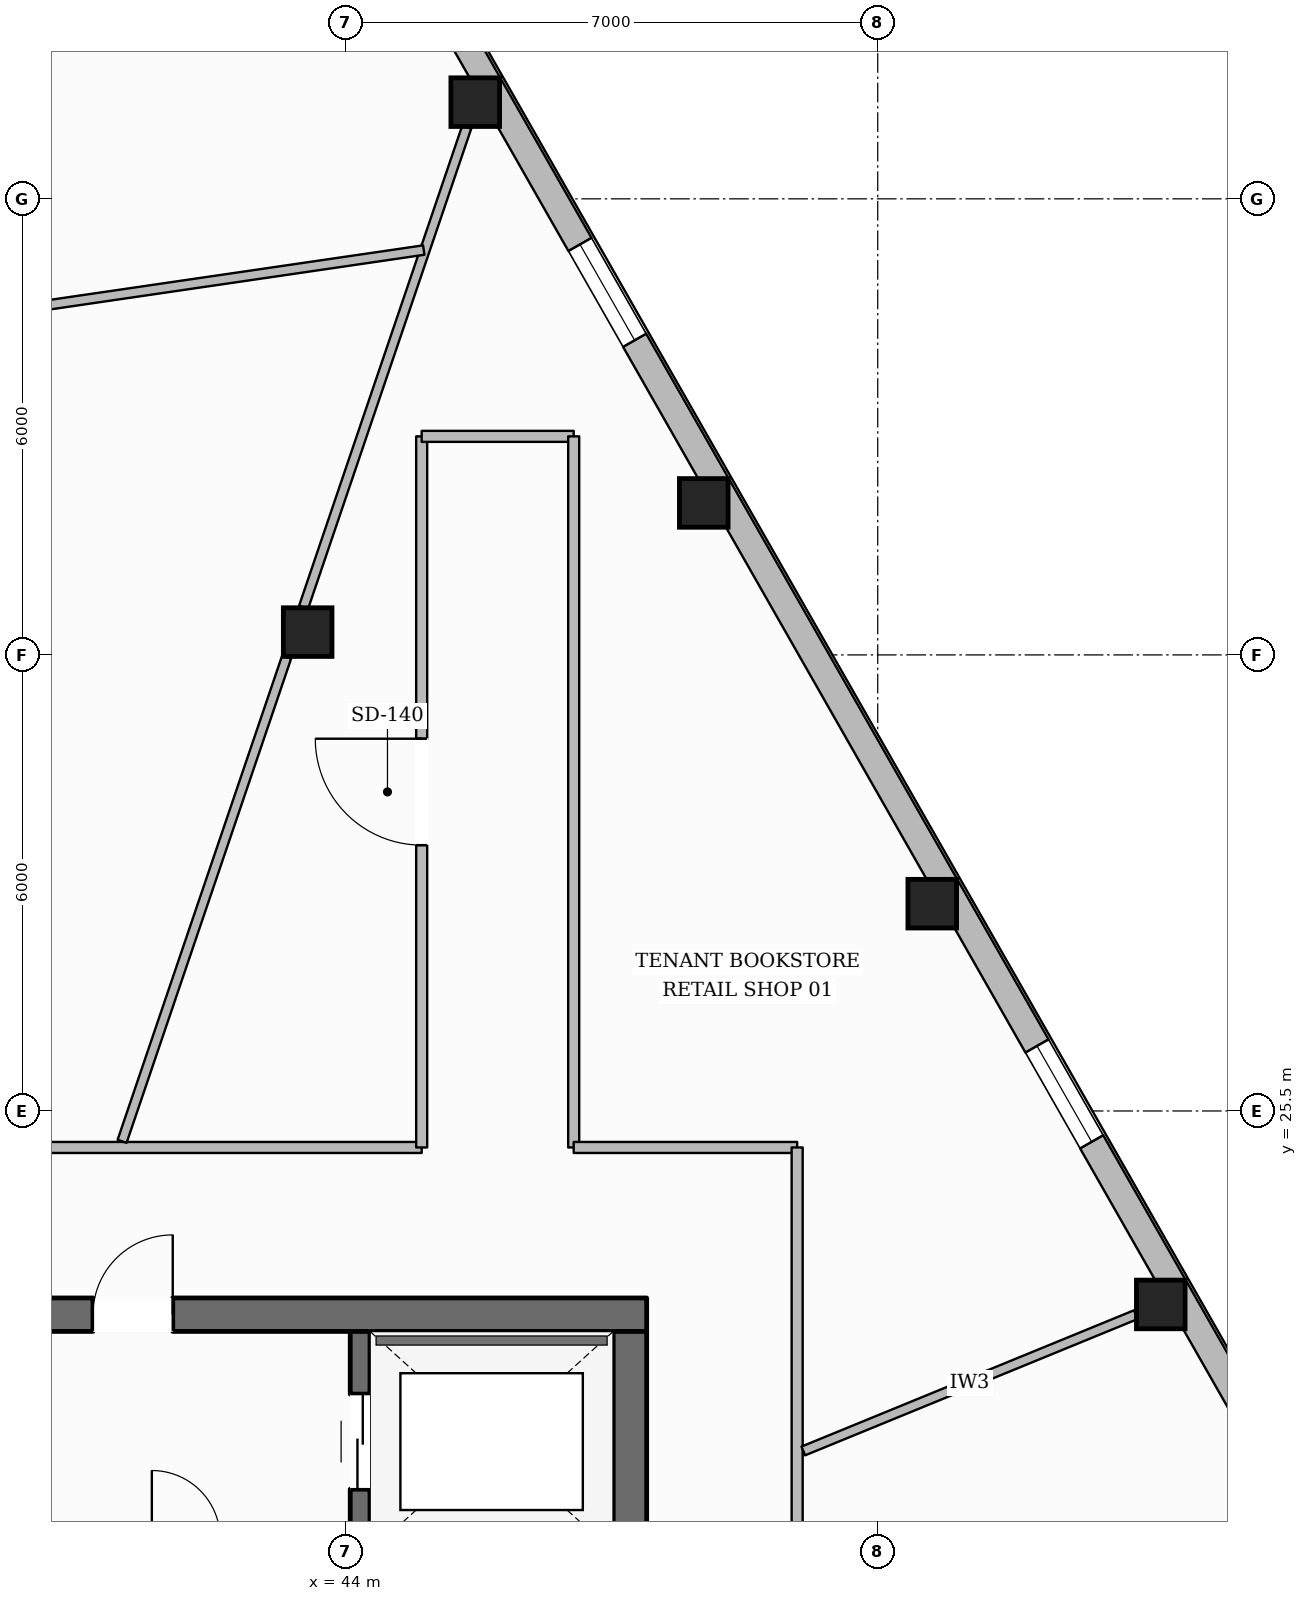
"""IFC4 building model, lengths in metres.
Left out: names, types, materials, properties, quantities, classifications, styles, units other than length and angle.
Written with IfcOpenShell. Run it as: python <this file> out.ifc"""

import sys

from ifc_helpers import new_model, si_unit, direction, frame, frame_2d, origin, origin_2d, place, context, subcontext, project, spatial, rectangle, hollow_rectangle, extrude, element, fill, save


model = new_model("IFC4")
c1 = context("Model", 3, precision=1e-05, world=origin(), true_north=direction((0.0, 1.0)))
c2 = subcontext(c1, "Body", "Model", "MODEL_VIEW")
j1 = project(units=[si_unit("LENGTHUNIT", "METRE"), si_unit("PLANEANGLEUNIT", "RADIAN")], contexts=[c1])
p1 = place(None, origin())
s1 = spatial("IfcSite", under=j1, at=p1, CompositionType="ELEMENT")
p2 = place(p1, origin())
s2 = spatial("IfcBuilding", under=s1, at=p2, CompositionType="ELEMENT")
p3 = place(p2, frame((0.0, 0.0, 168.85)))
s3 = spatial("IfcBuildingStorey", under=s2, at=p3, CompositionType="ELEMENT", Elevation=168.85)
p4 = place(p3, frame((28.04, 22.82, 0.0), z_axis=(0.0, 0.0, 1.0), x_axis=(1.0, 0.0, 0.0)))
e1 = element("IfcWall", 1, at=p4, inside=s3, PredefinedType="SOLIDWALL", context=c2, shape_type="SweptSolid", body=[
    extrude(rectangle(XDim=19.92, YDim=0.44, at=frame_2d((9.96, 0.0))), origin(), (0.0, 0.0, 1.0), 3.6),
])
p5 = place(p4, frame((6.235, 0.0, 0.0)))
e2 = element("IfcOpeningElement", 2, at=p5, cuts=e1, PredefinedType="OPENING", context=c2, shape_type="SweptSolid", body=[
    extrude(rectangle(XDim=1.05, YDim=2.15, at=frame_2d((0.525, 1.075))), frame((0.0, 0.23, 0.0), z_axis=(0.0, -1.0, 0.0), x_axis=(1.0, 0.0, 0.0)), (0.0, 0.0, 1.0), 0.46),
])
p6 = place(p4, frame((12.635, 0.0, 0.0)))
e3 = element("IfcOpeningElement", 3, at=p6, cuts=e1, PredefinedType="OPENING", context=c2, shape_type="SweptSolid", body=[
    extrude(rectangle(XDim=1.05, YDim=2.15, at=frame_2d((0.525, 1.075))), frame((0.0, 0.23, 0.0), z_axis=(0.0, -1.0, 0.0), x_axis=(1.0, 0.0, 0.0)), (0.0, 0.0, 1.0), 0.46),
])
p7 = place(p3, frame((47.74, 9.6, 0.0), z_axis=(0.0, 0.0, 1.0), x_axis=(0.0, 1.0, 0.0)))
e4 = element("IfcWall", 4, at=p7, inside=s3, PredefinedType="SOLIDWALL", context=c2, shape_type="SweptSolid", body=[
    extrude(rectangle(XDim=13.0, YDim=0.44, at=frame_2d((6.5, 0.0))), origin(), (0.0, 0.0, 1.0), 3.6),
])
p8 = place(p7, frame((0.2, 0.0, 0.0)))
e5 = element("IfcOpeningElement", 5, at=p8, cuts=e4, PredefinedType="OPENING", context=c2, shape_type="SweptSolid", body=[
    extrude(rectangle(XDim=1.1, YDim=2.15, at=frame_2d((0.55, 1.075))), frame((0.0, 0.23, 0.0), z_axis=(0.0, -1.0, 0.0), x_axis=(1.0, 0.0, 0.0)), (0.0, 0.0, 1.0), 0.46),
])
p9 = place(p7, frame((8.4, 0.0, 0.0)))
e6 = element("IfcOpeningElement", 6, at=p9, cuts=e4, PredefinedType="OPENING", context=c2, shape_type="SweptSolid", body=[
    extrude(rectangle(XDim=0.9, YDim=2.1, at=frame_2d((0.45, 1.05))), frame((0.0, 0.23, 0.0), z_axis=(0.0, -1.0, 0.0), x_axis=(1.0, 0.0, 0.0)), (0.0, 0.0, 1.0), 0.46),
])
p10 = place(p3, frame((44.19, 9.6, 0.0), z_axis=(0.0, 0.0, 1.0), x_axis=(0.0, 1.0, 0.0)))
e7 = element("IfcWall", 7, at=p10, inside=s3, PredefinedType="SHEAR", context=c2, shape_type="SweptSolid", body=[
    extrude(rectangle(XDim=13.0, YDim=0.26, at=frame_2d((6.5, 0.0))), origin(), (0.0, 0.0, 1.0), 3.6),
])
p11 = place(p10, frame((10.925, 0.0, 0.0)))
e8 = element("IfcOpeningElement", 8, at=p11, cuts=e7, PredefinedType="OPENING", context=c2, shape_type="SweptSolid", body=[
    extrude(rectangle(XDim=1.25, YDim=2.25, at=frame_2d((0.625, 1.125))), frame((0.0, 0.14, 0.0), z_axis=(0.0, -1.0, 0.0), x_axis=(1.0, 0.0, 0.0)), (0.0, 0.0, 1.0), 0.28),
])
for number, where, z_axis, x_axis in (
    (9, (54.723, 22.955, 0.0), (0.0, 0.0, 1.0), (1.0, 0.0, 0.0)),
    (10, (51.717, 28.227, 0.0), (0.0, 0.0, 1.0), (1.0, 0.0, 0.0)),
    (11, (48.711, 33.5, 0.0), (0.0, 0.0, 1.0), (1.0, 0.0, 0.0)),
    (12, (45.705, 38.772, 0.0), (0.0, 0.0, 1.0), (1.0, 0.0, 0.0)),
    (13, (43.5, 31.8, 0.0), (0.0, 0.0, 1.0), (1.0, 0.0, 0.0)),
):
    element("IfcColumn", number, at=place(p3, frame(where, z_axis=z_axis, x_axis=x_axis)), inside=s3, PredefinedType="COLUMN", context=c2, shape_type="SweptSolid", body=[
        extrude(hollow_rectangle(XDim=0.64, YDim=0.64, WallThickness=0.028, at=origin_2d()), origin(), (0.0, 0.0, 1.0), 3.6),
    ])
p12 = place(p3, frame((42.696, 44.593, 0.0), z_axis=(0.0, 0.0, 1.0), x_axis=(0.495321099056, -0.868709968188, 0.0)))
e14 = element("IfcWall", 14, at=p12, inside=s3, PredefinedType="STANDARD", context=c2, shape_type="SweptSolid", body=[
    extrude(rectangle(XDim=37.366, YDim=0.35, at=frame_2d((18.683, 0.0))), origin(), (0.0, 0.0, 1.0), 3.132),
])
p13 = place(p12, frame((33.134, 0.0, 0.65)))
e15 = element("IfcOpeningElement", 15, at=p13, cuts=e14, PredefinedType="OPENING", context=c2, shape_type="SweptSolid", body=[
    extrude(rectangle(XDim=1.45, YDim=1.75, at=frame_2d((0.725, 0.875))), frame((0.0, 0.185, 0.0), z_axis=(0.0, -1.0, 0.0), x_axis=(1.0, 0.0, 0.0)), (0.0, 0.0, 1.0), 0.37),
])
p14 = place(p12, frame((27.065, 0.0, 0.65)))
e16 = element("IfcOpeningElement", 16, at=p14, cuts=e14, PredefinedType="OPENING", context=c2, shape_type="SweptSolid", body=[
    extrude(rectangle(XDim=1.45, YDim=1.75, at=frame_2d((0.725, 0.875))), frame((0.0, 0.185, 0.0), z_axis=(0.0, -1.0, 0.0), x_axis=(1.0, 0.0, 0.0)), (0.0, 0.0, 1.0), 0.37),
])
p15 = place(p12, frame((20.995, 0.0, 0.65)))
e17 = element("IfcOpeningElement", 17, at=p15, cuts=e14, PredefinedType="OPENING", context=c2, shape_type="SweptSolid", body=[
    extrude(rectangle(XDim=1.45, YDim=1.75, at=frame_2d((0.725, 0.875))), frame((0.0, 0.185, 0.0), z_axis=(0.0, -1.0, 0.0), x_axis=(1.0, 0.0, 0.0)), (0.0, 0.0, 1.0), 0.37),
])
p16 = place(p12, frame((8.857, 0.0, 0.65)))
e18 = element("IfcOpeningElement", 18, at=p16, cuts=e14, PredefinedType="OPENING", context=c2, shape_type="SweptSolid", body=[
    extrude(rectangle(XDim=1.45, YDim=1.75, at=frame_2d((0.725, 0.875))), frame((0.0, 0.185, 0.0), z_axis=(0.0, -1.0, 0.0), x_axis=(1.0, 0.0, 0.0)), (0.0, 0.0, 1.0), 0.37),
])
p17 = place(p12, frame((2.787, 0.0, 0.65)))
e19 = element("IfcOpeningElement", 19, at=p17, cuts=e14, PredefinedType="OPENING", context=c2, shape_type="SweptSolid", body=[
    extrude(rectangle(XDim=1.45, YDim=1.75, at=frame_2d((0.725, 0.875))), frame((0.0, 0.185, 0.0), z_axis=(0.0, -1.0, 0.0), x_axis=(1.0, 0.0, 0.0)), (0.0, 0.0, 1.0), 0.37),
])
p18 = place(p3, frame((31.0, 25.02, 0.0), z_axis=(0.0, 0.0, 1.0), x_axis=(1.0, 0.0, 0.0)))
e20 = element("IfcWall", 20, at=p18, inside=s3, PredefinedType="PARTITIONING", context=c2, shape_type="SweptSolid", body=[
    extrude(rectangle(XDim=14.0, YDim=0.145, at=frame_2d((7.0, 0.0))), origin(), (0.0, 0.0, 1.0), 3.6),
])
p19 = place(p18, frame((4.413, 0.0, 0.0)))
e21 = element("IfcOpeningElement", 21, at=p19, cuts=e20, PredefinedType="OPENING", context=c2, shape_type="SweptSolid", body=[
    extrude(rectangle(XDim=1.4, YDim=2.2, at=frame_2d((0.7, 1.1))), frame((0.0, 0.083, 0.0), z_axis=(0.0, -1.0, 0.0), x_axis=(1.0, 0.0, 0.0)), (0.0, 0.0, 1.0), 0.165),
])
p20 = place(p3, frame((45.0, 25.02, 0.0), z_axis=(0.0, 0.0, 1.0), x_axis=(0.0, 1.0, 0.0)))
e22 = element("IfcWall", 22, at=p20, inside=s3, PredefinedType="PARTITIONING", context=c2, shape_type="SweptSolid", body=[
    extrude(rectangle(XDim=9.355, YDim=0.145, at=frame_2d((4.677, 0.0))), origin(), (0.0, 0.0, 1.0), 3.6),
])
p21 = place(p20, frame((3.978, 0.0, 0.0)))
e23 = element("IfcOpeningElement", 23, at=p21, cuts=e22, PredefinedType="OPENING", context=c2, shape_type="SweptSolid", body=[
    extrude(rectangle(XDim=1.4, YDim=2.2, at=frame_2d((0.7, 1.1))), frame((0.0, 0.083, 0.0), z_axis=(0.0, -1.0, 0.0), x_axis=(1.0, 0.0, 0.0)), (0.0, 0.0, 1.0), 0.165),
])
p22 = place(p3, frame((45.0, 34.375, 0.0), z_axis=(0.0, 0.0, 1.0), x_axis=(1.0, 0.0, 0.0)))
e24 = element("IfcWall", 24, at=p22, inside=s3, PredefinedType="PARTITIONING", context=c2, shape_type="SweptSolid", body=[
    extrude(rectangle(XDim=2.0, YDim=0.145, at=frame_2d((1.0, 0.0))), origin(), (0.0, 0.0, 1.0), 3.6),
])
p23 = place(p3, frame((47.0, 34.375, 0.0), z_axis=(0.0, 0.0, 1.0), x_axis=(0.0, -1.0, 0.0)))
e25 = element("IfcWall", 25, at=p23, inside=s3, PredefinedType="PARTITIONING", context=c2, shape_type="SweptSolid", body=[
    extrude(rectangle(XDim=9.355, YDim=0.145, at=frame_2d((4.677, 0.0))), origin(), (0.0, 0.0, 1.0), 3.6),
])
p24 = place(p3, frame((47.0, 25.02, 0.0), z_axis=(0.0, 0.0, 1.0), x_axis=(1.0, 0.0, 0.0)))
e26 = element("IfcWall", 26, at=p24, inside=s3, PredefinedType="PARTITIONING", context=c2, shape_type="SweptSolid", body=[
    extrude(rectangle(XDim=2.94, YDim=0.145, at=frame_2d((1.47, 0.0))), origin(), (0.0, 0.0, 1.0), 3.6),
])
p25 = place(p3, frame((49.94, 25.02, 0.0), z_axis=(0.0, 0.0, 1.0), x_axis=(0.0, -1.0, 0.0)))
e27 = element("IfcWall", 27, at=p25, inside=s3, PredefinedType="PARTITIONING", context=c2, shape_type="SweptSolid", body=[
    extrude(rectangle(XDim=7.92, YDim=0.145, at=frame_2d((3.96, 0.0))), origin(), (0.0, 0.0, 1.0), 3.339),
])
p26 = place(p3, frame((50.021, 21.027, 0.0), z_axis=(0.0, 0.0, 1.0), x_axis=(0.925291772023, 0.379256030441, 0.0)))
e28 = element("IfcWall", 28, at=p26, inside=s3, PredefinedType="PARTITIONING", context=c2, shape_type="SweptSolid", body=[
    extrude(rectangle(XDim=4.728, YDim=0.125, at=frame_2d((2.364, 0.0))), origin(), (0.0, 0.0, 1.0), 3.6),
])
p27 = place(p3, frame((41.059, 25.101, 0.0), z_axis=(0.0, 0.0, 1.0), x_axis=(0.321773295772, 0.946816743688, 0.0)))
e29 = element("IfcWall", 29, at=p27, inside=s3, PredefinedType="PARTITIONING", context=c2, shape_type="SweptSolid", body=[
    extrude(rectangle(XDim=6.729, YDim=0.125, at=frame_2d((3.365, 0.0))), origin(), (0.0, 0.0, 1.0), 3.141),
])
p28 = place(p3, frame((43.447, 32.128, 0.0), z_axis=(0.0, 0.0, 1.0), x_axis=(0.321734106444, 0.946830061178, 0.0)))
e30 = element("IfcWall", 30, at=p28, inside=s3, PredefinedType="PARTITIONING", context=c2, shape_type="SweptSolid", body=[
    extrude(rectangle(XDim=6.671, YDim=0.125, at=frame_2d((3.335, 0.0))), origin(), (0.0, 0.0, 1.0), 3.6),
])
p29 = place(p3, frame((45.027, 36.826, 0.0), z_axis=(0.0, 0.0, 1.0), x_axis=(-0.989495020957, -0.144566951625, 0.0)))
e31 = element("IfcWall", 31, at=p29, inside=s3, PredefinedType="PARTITIONING", context=c2, shape_type="SweptSolid", body=[
    extrude(rectangle(XDim=17.523, YDim=0.125, at=frame_2d((8.761, 0.0))), origin(), (0.0, 0.0, 1.0), 3.6),
])
p30 = place(p29, frame((8.388, 0.0, 0.0)))
e32 = element("IfcOpeningElement", 32, at=p30, cuts=e31, PredefinedType="OPENING", context=c2, shape_type="SweptSolid", body=[
    extrude(rectangle(XDim=0.98, YDim=2.15, at=frame_2d((0.49, 1.075))), frame((0.0, 0.073, 0.0), z_axis=(0.0, -1.0, 0.0), x_axis=(1.0, 0.0, 0.0)), (0.0, 0.0, 1.0), 0.145),
])
p31 = place(p15, origin())
e33 = element("IfcWindow", 33, at=p31, inside=s3, PartitioningType="SINGLE_PANEL", PredefinedType="WINDOW", context=c2, shape_type="SweptSolid", body=[
    extrude(rectangle(XDim=1.45, YDim=1.75, at=frame_2d((0.725, 0.875))), frame((0.0, 0.03, 0.0), z_axis=(0.0, -1.0, 0.0), x_axis=(1.0, 0.0, 0.0)), (0.0, 0.0, 1.0), 0.06),
])
fill(e17, e33)
p32 = place(p16, origin())
e34 = element("IfcWindow", 34, at=p32, inside=s3, PartitioningType="SINGLE_PANEL", PredefinedType="WINDOW", context=c2, shape_type="SweptSolid", body=[
    extrude(rectangle(XDim=1.45, YDim=1.75, at=frame_2d((0.725, 0.875))), frame((0.0, 0.03, 0.0), z_axis=(0.0, -1.0, 0.0), x_axis=(1.0, 0.0, 0.0)), (0.0, 0.0, 1.0), 0.06),
])
fill(e18, e34)
p33 = place(p6, origin())
e35 = element("IfcDoor", 35, at=p33, inside=s3, OperationType="SINGLE_SWING_RIGHT", PredefinedType="DOOR", context=c2, shape_type="SweptSolid", body=[
    extrude(rectangle(XDim=1.05, YDim=2.15, at=frame_2d((0.525, 1.075))), frame((0.0, 0.025, 0.0), z_axis=(0.0, -1.0, 0.0), x_axis=(1.0, 0.0, 0.0)), (0.0, 0.0, 1.0), 0.05),
])
fill(e3, e35)
p34 = place(p11, origin())
e36 = element("IfcDoor", 36, at=p34, inside=s3, OperationType="DOUBLE_DOOR_SLIDING", PredefinedType="DOOR", context=c2, shape_type="SweptSolid", body=[
    extrude(rectangle(XDim=1.25, YDim=2.25, at=frame_2d((0.625, 1.125))), frame((0.0, 0.025, 0.0), z_axis=(0.0, -1.0, 0.0), x_axis=(1.0, 0.0, 0.0)), (0.0, 0.0, 1.0), 0.05),
])
fill(e8, e36)
p35 = place(p21, origin())
e37 = element("IfcDoor", 37, at=p35, inside=s3, OperationType="SINGLE_SWING_RIGHT", PredefinedType="DOOR", context=c2, shape_type="SweptSolid", body=[
    extrude(rectangle(XDim=1.4, YDim=2.2, at=frame_2d((0.7, 1.1))), frame((0.0, 0.025, 0.0), z_axis=(0.0, -1.0, 0.0), x_axis=(1.0, 0.0, 0.0)), (0.0, 0.0, 1.0), 0.05),
])
fill(e23, e37)
save(model, sys.argv[1])
